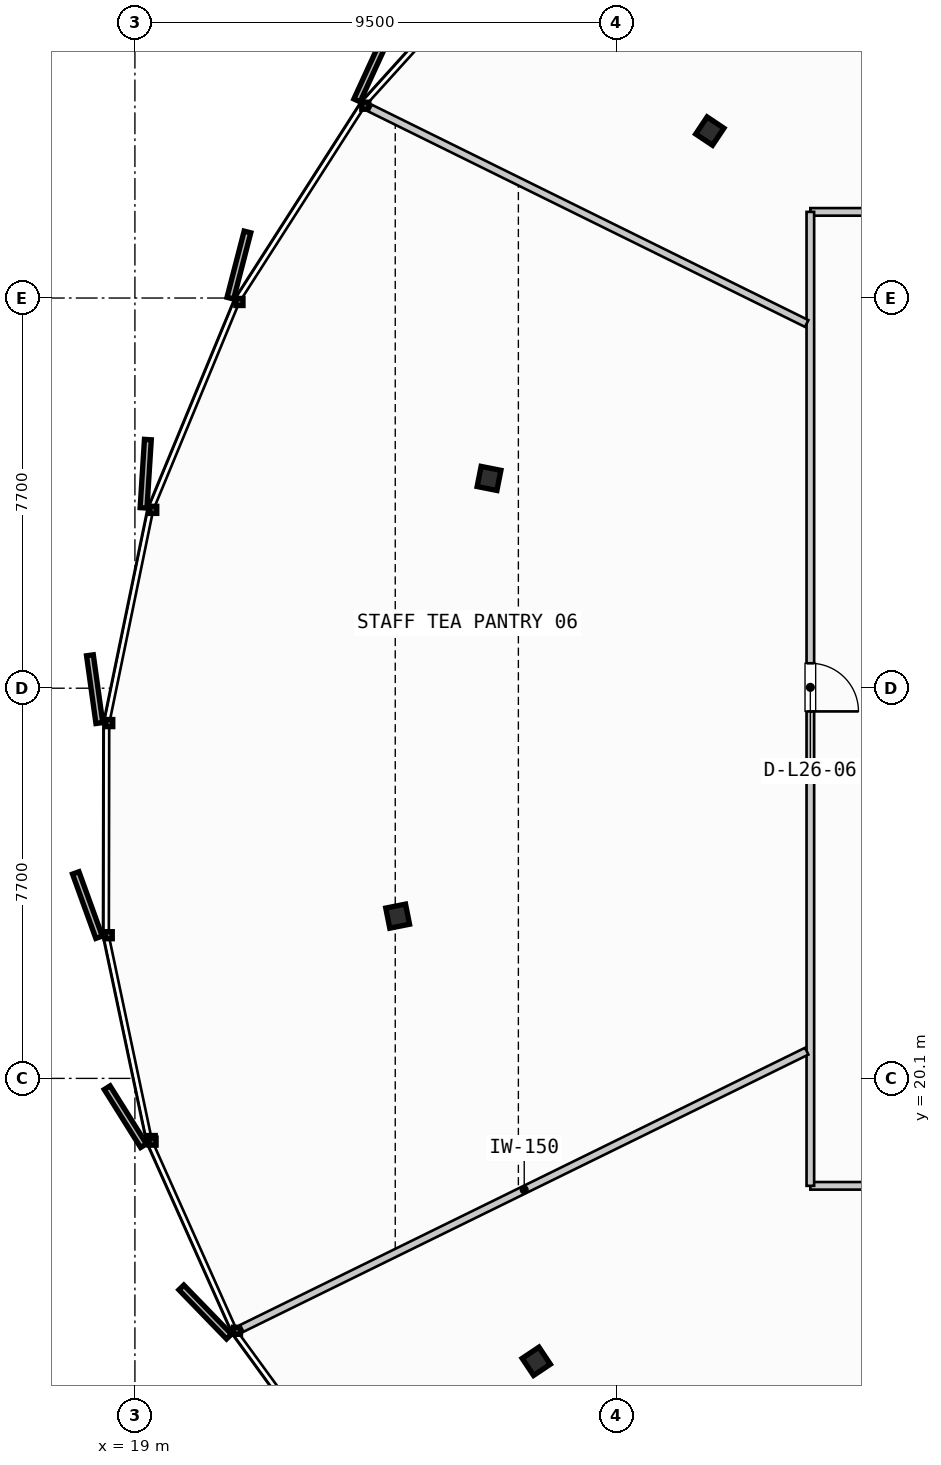
"""IFC4 building model, lengths in metres.
Left out: names, types, materials, properties, quantities, classifications, styles, units other than length and angle.
Written with IfcOpenShell. Run it as: python <this file> out.ifc"""

import sys

from ifc_helpers import new_model, si_unit, direction, frame, frame_2d, origin, origin_2d, place, context, subcontext, project, spatial, rectangle, i_section, extrude, source, transform, mapped, element, fill, save


model = new_model("IFC4")
c1 = context("Model", 3, precision=1e-05, world=origin(), true_north=direction((0.0, 1.0)))
c2 = subcontext(c1, "Body", "Model", "MODEL_VIEW")
j1 = project(units=[si_unit("LENGTHUNIT", "METRE"), si_unit("PLANEANGLEUNIT", "RADIAN")], contexts=[c1])
p1 = place(None, origin())
s1 = spatial("IfcSite", under=j1, at=p1, CompositionType="ELEMENT")
p2 = place(p1, origin())
s2 = spatial("IfcBuilding", under=s1, at=p2, CompositionType="ELEMENT")
p3 = place(p2, frame((0.0, 0.0, 107.2)))
s3 = spatial("IfcBuildingStorey", under=s2, at=p3, CompositionType="ELEMENT", Elevation=107.2)
m1 = source(origin(), c2, "Body", "SweptSolid", [
    extrude(i_section(OverallWidth=0.405, OverallDepth=0.398, WebThickness=0.035, FlangeThickness=0.056, FilletRadius=0.015, at=origin_2d()), origin(), (0.0, 0.0, 1.0), 3.35),
])
for number, where, z_axis, x_axis in (
    (1, (30.346, 38.794, 0.0), (0.0, 0.0, 1.0), (-0.831, 0.556, 0.0)),
    (2, (25.989, 31.94, 0.0), (0.0, 0.0, 1.0), (-0.981, 0.195, 0.0)),
    (3, (24.185, 23.302, 0.0), (0.0, 0.0, 1.0), (-0.981, -0.195, 0.0)),
    (4, (26.921, 14.517, 0.0), (0.0, 0.0, 1.0), (-0.831, -0.556, 0.0)),
):
    element("IfcColumn", number, at=place(p3, frame(where, z_axis=z_axis, x_axis=x_axis)), inside=s3, PredefinedType="COLUMN", context=c2, shape_type="MappedRepresentation", body=[
        mapped(m1, transform((0.0, 0.0, 0.0), scale=1.0)),
    ])
p4 = place(p3, frame((32.33, 17.98, 0.0), z_axis=(0.0, 0.0, 1.0), x_axis=(1.0, 0.0, 0.0)))
e5 = element("IfcWall", 5, at=p4, inside=s3, PredefinedType="PARTITIONING", context=c2, shape_type="SweptSolid", body=[
    extrude(rectangle(XDim=30.5, YDim=0.15, at=frame_2d((15.25, 0.0))), origin(), (0.0, 0.0, 1.0), 2.28),
])
p5 = place(p4, frame((14.775, 0.0, 0.0)))
e6 = element("IfcOpeningElement", 6, at=p5, cuts=e5, PredefinedType="OPENING", context=c2, shape_type="SweptSolid", body=[
    extrude(rectangle(XDim=0.95, YDim=2.15, at=frame_2d((0.475, 1.075))), frame((0.0, 0.085, 0.0), z_axis=(0.0, -1.0, 0.0), x_axis=(1.0, 0.0, 0.0)), (0.0, 0.0, 1.0), 0.17),
])
p6 = place(p3, frame((62.83, 37.2, 0.0), z_axis=(0.0, 0.0, 1.0), x_axis=(-1.0, 0.0, 0.0)))
e7 = element("IfcWall", 7, at=p6, inside=s3, PredefinedType="PARTITIONING", context=c2, shape_type="SweptSolid", body=[
    extrude(rectangle(XDim=30.5, YDim=0.15, at=frame_2d((15.25, 0.0))), origin(), (0.0, 0.0, 1.0), 2.28),
])
p7 = place(p6, frame((5.281, 0.0, 0.0)))
e8 = element("IfcOpeningElement", 8, at=p7, cuts=e7, PredefinedType="OPENING", context=c2, shape_type="SweptSolid", body=[
    extrude(rectangle(XDim=0.95, YDim=2.15, at=frame_2d((0.475, 1.075))), frame((0.0, 0.085, 0.0), z_axis=(0.0, -1.0, 0.0), x_axis=(1.0, 0.0, 0.0)), (0.0, 0.0, 1.0), 0.17),
])
p8 = place(p6, frame((19.932, 0.0, 0.0)))
e9 = element("IfcOpeningElement", 9, at=p8, cuts=e7, PredefinedType="OPENING", context=c2, shape_type="SweptSolid", body=[
    extrude(rectangle(XDim=0.95, YDim=2.15, at=frame_2d((0.475, 1.075))), frame((0.0, 0.085, 0.0), z_axis=(0.0, -1.0, 0.0), x_axis=(1.0, 0.0, 0.0)), (0.0, 0.0, 1.0), 0.17),
])
p9 = place(p3, frame((32.33, 37.2, 0.0), z_axis=(0.0, 0.0, 1.0), x_axis=(0.0, -1.0, 0.0)))
e10 = element("IfcWall", 10, at=p9, inside=s3, PredefinedType="PARTITIONING", context=c2, shape_type="SweptSolid", body=[
    extrude(rectangle(XDim=19.22, YDim=0.15, at=frame_2d((9.61, 0.0))), origin(), (0.0, 0.0, 1.0), 2.28),
])
p10 = place(p9, frame((8.908, 0.0, 0.0)))
e11 = element("IfcOpeningElement", 11, at=p10, cuts=e10, PredefinedType="OPENING", context=c2, shape_type="SweptSolid", body=[
    extrude(rectangle(XDim=0.95, YDim=2.15, at=frame_2d((0.475, 1.075))), frame((0.0, 0.085, 0.0), z_axis=(0.0, -1.0, 0.0), x_axis=(1.0, 0.0, 0.0)), (0.0, 0.0, 1.0), 0.17),
])
p11 = place(p3, frame((32.258, 20.637, 0.0), z_axis=(0.0, 0.0, 1.0), x_axis=(-0.897759490266, -0.440485978933, 0.0)))
e12 = element("IfcWall", 12, at=p11, inside=s3, PredefinedType="PARTITIONING", context=c2, shape_type="SweptSolid", body=[
    extrude(rectangle(XDim=12.42, YDim=0.15, at=frame_2d((6.21, 0.0))), origin(), (0.0, 0.0, 1.0), 2.28),
])
p12 = place(p3, frame((32.258, 34.997, 0.0), z_axis=(0.0, 0.0, 1.0), x_axis=(-0.896802793209, 0.442430503121, 0.0)))
e13 = element("IfcWall", 13, at=p12, inside=s3, PredefinedType="PARTITIONING", context=c2, shape_type="SweptSolid", body=[
    extrude(rectangle(XDim=9.609, YDim=0.15, at=frame_2d((4.804, 0.0))), origin(), (0.0, 0.0, 1.0), 2.28),
])
m2 = source(origin(), c2, "Body", "SweptSolid", [
    extrude(rectangle(XDim=0.95, YDim=2.15, at=frame_2d((0.475, 1.075))), frame((0.0, 0.025, 0.0), z_axis=(0.0, -1.0, 0.0), x_axis=(1.0, 0.0, 0.0)), (0.0, 0.0, 1.0), 0.05),
])
p13 = place(p10, origin())
e14 = element("IfcDoor", 14, at=p13, inside=s3, OperationType="SINGLE_SWING_RIGHT", PredefinedType="DOOR", context=c2, shape_type="MappedRepresentation", body=[
    mapped(m2, transform((0.0, 0.0, 0.0), scale=1.0)),
])
fill(e11, e14)
save(model, sys.argv[1])
